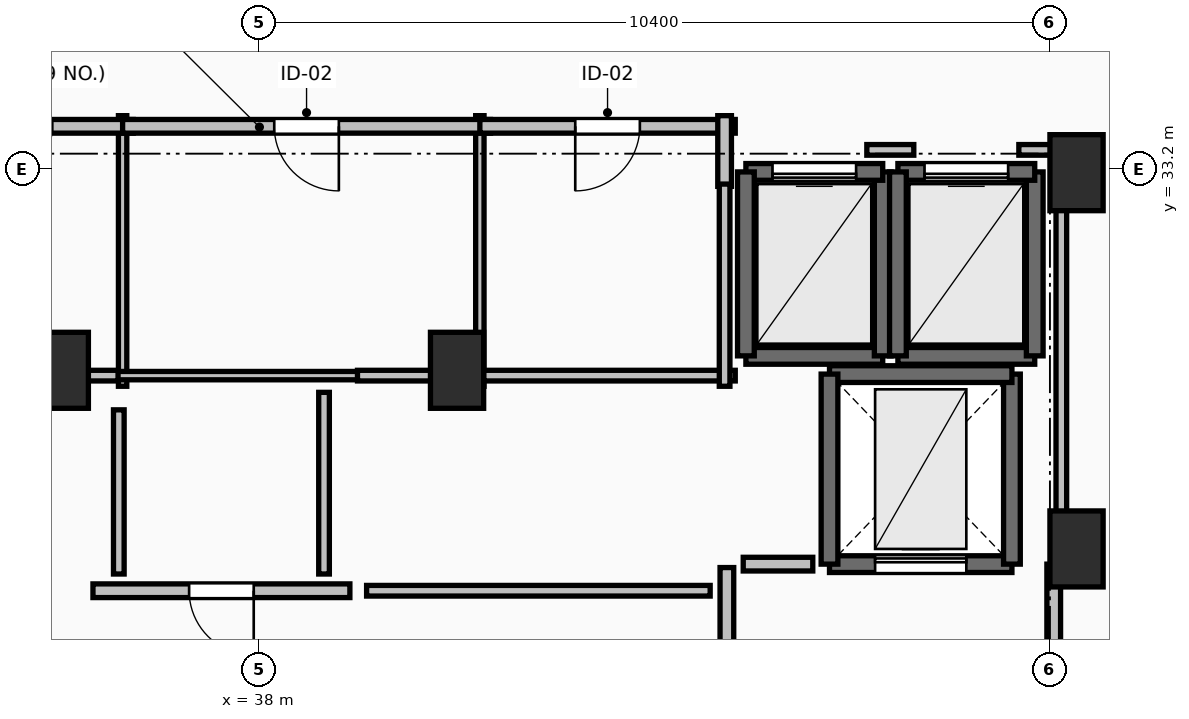
"""IFC4 building model, lengths in metres.
Left out: names, types, materials, properties, quantities, classifications, styles, units other than length and angle.
Written with IfcOpenShell. Run it as: python <this file> out.ifc"""

import sys

from ifc_helpers import new_model, si_unit, direction, frame, frame_2d, origin, origin_2d, place, context, subcontext, project, spatial, rectangle, extrude, element, fill, save


model = new_model("IFC4")
c1 = context("Model", 3, precision=1e-05, world=origin(), true_north=direction((0.0, 1.0)))
c2 = subcontext(c1, "Body", "Model", "MODEL_VIEW")
j1 = project(units=[si_unit("LENGTHUNIT", "METRE"), si_unit("PLANEANGLEUNIT", "RADIAN")], contexts=[c1])
p1 = place(None, origin())
s1 = spatial("IfcSite", under=j1, at=p1, CompositionType="ELEMENT")
p2 = place(p1, origin())
s2 = spatial("IfcBuilding", under=s1, at=p2, CompositionType="ELEMENT")
p3 = place(p2, frame((0.0, 0.0, 290.4)))
s3 = spatial("IfcBuildingStorey", under=s2, at=p3, CompositionType="ELEMENT", Elevation=290.4)
for number, where, z_axis, x_axis in (
    (1, (48.75, 33.15, 0.0), (0.0, 0.0, 1.0), (1.0, 0.0, 0.0)),
    (2, (48.75, 28.2, 0.0), (0.0, 0.0, 1.0), (1.0, 0.0, 0.0)),
    (3, (35.4, 30.55, 0.0), (0.0, 0.0, 1.0), (1.0, 0.0, 0.0)),
    (4, (40.6, 30.55, 0.0), (0.0, 0.0, 1.0), (1.0, 0.0, 0.0)),
):
    element("IfcColumn", number, at=place(p3, frame(where, z_axis=z_axis, x_axis=x_axis)), inside=s3, PredefinedType="PILASTER", context=c2, shape_type="SweptSolid", body=[
        extrude(rectangle(XDim=0.7, YDim=1.0, at=origin_2d()), origin(), (0.0, 0.0, 1.0), 5.0),
    ])
p4 = place(p3, frame((44.4, 30.74, 0.0), z_axis=(0.0, 0.0, 1.0), x_axis=(1.0, 0.0, 0.0)))
e5 = element("IfcWall", 5, at=p4, inside=s3, PredefinedType="SOLIDWALL", context=c2, shape_type="SweptSolid", body=[
    extrude(rectangle(XDim=1.8, YDim=0.22, at=frame_2d((0.9, 0.0))), origin(), (0.0, 0.0, 1.0), 4.72),
])
p5 = place(p3, frame((46.2, 30.74, 0.0), z_axis=(0.0, 0.0, 1.0), x_axis=(0.0, 1.0, 0.0)))
e6 = element("IfcWall", 6, at=p5, inside=s3, PredefinedType="SOLIDWALL", context=c2, shape_type="SweptSolid", body=[
    extrude(rectangle(XDim=2.42, YDim=0.22, at=frame_2d((1.21, 0.0))), origin(), (0.0, 0.0, 1.0), 4.72),
])
p6 = place(p3, frame((46.2, 33.16, 0.0), z_axis=(0.0, 0.0, 1.0), x_axis=(-1.0, 0.0, 0.0)))
e7 = element("IfcWall", 7, at=p6, inside=s3, PredefinedType="SOLIDWALL", context=c2, shape_type="SweptSolid", body=[
    extrude(rectangle(XDim=1.8, YDim=0.22, at=frame_2d((0.9, 0.0))), origin(), (0.0, 0.0, 1.0), 4.72),
])
p7 = place(p6, frame((0.35, 0.0, 0.0)))
e8 = element("IfcOpeningElement", 8, at=p7, cuts=e7, PredefinedType="OPENING", context=c2, shape_type="SweptSolid", body=[
    extrude(rectangle(XDim=1.1, YDim=2.2, at=frame_2d((0.55, 1.1))), frame((0.0, 0.125, 0.0), z_axis=(0.0, -1.0, 0.0), x_axis=(1.0, 0.0, 0.0)), (0.0, 0.0, 1.0), 0.25),
])
p8 = place(p3, frame((44.4, 33.16, 0.0), z_axis=(0.0, 0.0, 1.0), x_axis=(0.0, -1.0, 0.0)))
e9 = element("IfcWall", 9, at=p8, inside=s3, PredefinedType="SOLIDWALL", context=c2, shape_type="SweptSolid", body=[
    extrude(rectangle(XDim=2.42, YDim=0.22, at=frame_2d((1.21, 0.0))), origin(), (0.0, 0.0, 1.0), 4.72),
])
p9 = place(p3, frame((46.4, 30.74, 0.0), z_axis=(0.0, 0.0, 1.0), x_axis=(1.0, 0.0, 0.0)))
e10 = element("IfcWall", 10, at=p9, inside=s3, PredefinedType="SOLIDWALL", context=c2, shape_type="SweptSolid", body=[
    extrude(rectangle(XDim=1.8, YDim=0.22, at=frame_2d((0.9, 0.0))), origin(), (0.0, 0.0, 1.0), 4.72),
])
p10 = place(p3, frame((48.2, 30.74, 0.0), z_axis=(0.0, 0.0, 1.0), x_axis=(0.0, 1.0, 0.0)))
e11 = element("IfcWall", 11, at=p10, inside=s3, PredefinedType="SOLIDWALL", context=c2, shape_type="SweptSolid", body=[
    extrude(rectangle(XDim=2.42, YDim=0.22, at=frame_2d((1.21, 0.0))), origin(), (0.0, 0.0, 1.0), 4.72),
])
p11 = place(p3, frame((48.2, 33.16, 0.0), z_axis=(0.0, 0.0, 1.0), x_axis=(-1.0, 0.0, 0.0)))
e12 = element("IfcWall", 12, at=p11, inside=s3, PredefinedType="SOLIDWALL", context=c2, shape_type="SweptSolid", body=[
    extrude(rectangle(XDim=1.8, YDim=0.22, at=frame_2d((0.9, 0.0))), origin(), (0.0, 0.0, 1.0), 4.72),
])
p12 = place(p11, frame((0.35, 0.0, 0.0)))
e13 = element("IfcOpeningElement", 13, at=p12, cuts=e12, PredefinedType="OPENING", context=c2, shape_type="SweptSolid", body=[
    extrude(rectangle(XDim=1.1, YDim=2.2, at=frame_2d((0.55, 1.1))), frame((0.0, 0.125, 0.0), z_axis=(0.0, -1.0, 0.0), x_axis=(1.0, 0.0, 0.0)), (0.0, 0.0, 1.0), 0.25),
])
p13 = place(p3, frame((46.4, 33.16, 0.0), z_axis=(0.0, 0.0, 1.0), x_axis=(0.0, -1.0, 0.0)))
e14 = element("IfcWall", 14, at=p13, inside=s3, PredefinedType="SOLIDWALL", context=c2, shape_type="SweptSolid", body=[
    extrude(rectangle(XDim=2.42, YDim=0.22, at=frame_2d((1.21, 0.0))), origin(), (0.0, 0.0, 1.0), 4.72),
])
p14 = place(p3, frame((45.5, 28.0, 0.0), z_axis=(0.0, 0.0, 1.0), x_axis=(1.0, 0.0, 0.0)))
e15 = element("IfcWall", 15, at=p14, inside=s3, PredefinedType="SHEAR", context=c2, shape_type="SweptSolid", body=[
    extrude(rectangle(XDim=2.4, YDim=0.22, at=frame_2d((1.2, 0.0))), origin(), (0.0, 0.0, 1.0), 4.72),
])
p15 = place(p14, frame((0.6, 0.0, 0.0)))
e16 = element("IfcOpeningElement", 16, at=p15, cuts=e15, PredefinedType="OPENING", context=c2, shape_type="SweptSolid", body=[
    extrude(rectangle(XDim=1.2, YDim=2.2, at=frame_2d((0.6, 1.1))), frame((0.0, 0.125, 0.0), z_axis=(0.0, -1.0, 0.0), x_axis=(1.0, 0.0, 0.0)), (0.0, 0.0, 1.0), 0.25),
])
p16 = place(p3, frame((47.9, 28.0, 0.0), z_axis=(0.0, 0.0, 1.0), x_axis=(0.0, 1.0, 0.0)))
e17 = element("IfcWall", 17, at=p16, inside=s3, PredefinedType="SHEAR", context=c2, shape_type="SweptSolid", body=[
    extrude(rectangle(XDim=2.5, YDim=0.22, at=frame_2d((1.25, 0.0))), origin(), (0.0, 0.0, 1.0), 4.72),
])
p17 = place(p3, frame((47.9, 30.5, 0.0), z_axis=(0.0, 0.0, 1.0), x_axis=(-1.0, 0.0, 0.0)))
e18 = element("IfcWall", 18, at=p17, inside=s3, PredefinedType="SHEAR", context=c2, shape_type="SweptSolid", body=[
    extrude(rectangle(XDim=2.4, YDim=0.22, at=frame_2d((1.2, 0.0))), origin(), (0.0, 0.0, 1.0), 4.72),
])
p18 = place(p3, frame((45.5, 30.5, 0.0), z_axis=(0.0, 0.0, 1.0), x_axis=(0.0, -1.0, 0.0)))
e19 = element("IfcWall", 19, at=p18, inside=s3, PredefinedType="SHEAR", context=c2, shape_type="SweptSolid", body=[
    extrude(rectangle(XDim=2.5, YDim=0.22, at=frame_2d((1.25, 0.0))), origin(), (0.0, 0.0, 1.0), 4.72),
])
p19 = place(p3, frame((44.15, 27.955, 0.0), z_axis=(0.0, 0.0, 1.0), x_axis=(0.0, -1.0, 0.0)))
e20 = element("IfcWall", 20, at=p19, inside=s3, PredefinedType="PARTITIONING", context=c2, shape_type="SweptSolid", body=[
    extrude(rectangle(XDim=3.91, YDim=0.18, at=frame_2d((1.955, 0.0))), origin(), (0.0, 0.0, 1.0), 4.72),
])
p20 = place(p19, frame((1.355, 0.0, 0.0)))
e21 = element("IfcOpeningElement", 21, at=p20, cuts=e20, PredefinedType="OPENING", context=c2, shape_type="SweptSolid", body=[
    extrude(rectangle(XDim=1.2, YDim=2.15, at=frame_2d((0.6, 1.075))), frame((0.0, 0.105, 0.0), z_axis=(0.0, -1.0, 0.0), x_axis=(1.0, 0.0, 0.0)), (0.0, 0.0, 1.0), 0.21),
])
p21 = place(p3, frame((48.45, 23.95, 0.0), z_axis=(0.0, 0.0, 1.0), x_axis=(0.0, 1.0, 0.0)))
e22 = element("IfcWall", 22, at=p21, inside=s3, PredefinedType="PARTITIONING", context=c2, shape_type="SweptSolid", body=[
    extrude(rectangle(XDim=4.05, YDim=0.18, at=frame_2d((2.025, 0.0))), origin(), (0.0, 0.0, 1.0), 4.72),
])
p22 = place(p21, frame((1.425, 0.0, 0.0)))
e23 = element("IfcOpeningElement", 23, at=p22, cuts=e22, PredefinedType="OPENING", context=c2, shape_type="SweptSolid", body=[
    extrude(rectangle(XDim=1.2, YDim=2.15, at=frame_2d((0.6, 1.075))), frame((0.0, 0.105, 0.0), z_axis=(0.0, -1.0, 0.0), x_axis=(1.0, 0.0, 0.0)), (0.0, 0.0, 1.0), 0.21),
])
p23 = place(p3, frame((39.19, 27.65, 0.0), z_axis=(0.0, 0.0, 1.0), x_axis=(-1.0, 0.0, 0.0)))
e24 = element("IfcWall", 24, at=p23, inside=s3, PredefinedType="PARTITIONING", context=c2, shape_type="SweptSolid", body=[
    extrude(rectangle(XDim=3.38, YDim=0.18, at=frame_2d((1.69, 0.0))), origin(), (0.0, 0.0, 1.0), 4.72),
])
p24 = place(p23, frame((1.265, 0.0, 0.0)))
e25 = element("IfcOpeningElement", 25, at=p24, cuts=e24, PredefinedType="OPENING", context=c2, shape_type="SweptSolid", body=[
    extrude(rectangle(XDim=0.85, YDim=2.1, at=frame_2d((0.425, 1.05))), frame((0.0, 0.105, 0.0), z_axis=(0.0, -1.0, 0.0), x_axis=(1.0, 0.0, 0.0)), (0.0, 0.0, 1.0), 0.21),
])
p25 = place(p3, frame((36.2, 30.34, 0.0), z_axis=(0.0, 0.0, 1.0), x_axis=(0.0, 1.0, 0.0)))
e26 = element("IfcWall", 26, at=p25, inside=s3, PredefinedType="PARTITIONING", context=c2, shape_type="SweptSolid", body=[
    extrude(rectangle(XDim=3.56, YDim=0.11, at=frame_2d((1.78, 0.0))), origin(), (0.0, 0.0, 1.0), 3.912),
])
p26 = place(p3, frame((36.34, 33.76, 0.0), z_axis=(0.0, 0.0, 1.0), x_axis=(-1.0, 0.0, 0.0)))
e27 = element("IfcWall", 27, at=p26, inside=s3, PredefinedType="PARTITIONING", context=c2, shape_type="SweptSolid", body=[
    extrude(rectangle(XDim=2.98, YDim=0.18, at=frame_2d((1.49, 0.0))), origin(), (0.0, 0.0, 1.0), 4.72),
])
p27 = place(p26, frame((1.065, 0.0, 0.0)))
e28 = element("IfcOpeningElement", 28, at=p27, cuts=e27, PredefinedType="OPENING", context=c2, shape_type="SweptSolid", body=[
    extrude(rectangle(XDim=0.85, YDim=2.1, at=frame_2d((0.425, 1.05))), frame((0.0, 0.105, 0.0), z_axis=(0.0, -1.0, 0.0), x_axis=(1.0, 0.0, 0.0)), (0.0, 0.0, 1.0), 0.21),
])
p28 = place(p3, frame((40.9, 30.34, 0.0), z_axis=(0.0, 0.0, 1.0), x_axis=(0.0, 1.0, 0.0)))
e29 = element("IfcWall", 29, at=p28, inside=s3, PredefinedType="PARTITIONING", context=c2, shape_type="SweptSolid", body=[
    extrude(rectangle(XDim=3.56, YDim=0.11, at=frame_2d((1.78, 0.0))), origin(), (0.0, 0.0, 1.0), 4.72),
])
p29 = place(p3, frame((36.11, 30.48, 0.0), z_axis=(0.0, 0.0, 1.0), x_axis=(1.0, 0.0, 0.0)))
e30 = element("IfcWall", 30, at=p29, inside=s3, PredefinedType="PARTITIONING", context=c2, shape_type="SweptSolid", body=[
    extrude(rectangle(XDim=3.21, YDim=0.11, at=frame_2d((1.605, 0.0))), origin(), (0.0, 0.0, 1.0), 3.912),
])
p30 = place(p3, frame((41.04, 33.76, 0.0), z_axis=(0.0, 0.0, 1.0), x_axis=(-1.0, 0.0, 0.0)))
e31 = element("IfcWall", 31, at=p30, inside=s3, PredefinedType="PARTITIONING", context=c2, shape_type="SweptSolid", body=[
    extrude(rectangle(XDim=4.84, YDim=0.18, at=frame_2d((2.42, 0.0))), origin(), (0.0, 0.0, 1.0), 4.72),
])
p31 = place(p30, frame((1.995, 0.0, 0.0)))
e32 = element("IfcOpeningElement", 32, at=p31, cuts=e31, PredefinedType="OPENING", context=c2, shape_type="SweptSolid", body=[
    extrude(rectangle(XDim=0.85, YDim=2.1, at=frame_2d((0.425, 1.05))), frame((0.0, 0.105, 0.0), z_axis=(0.0, -1.0, 0.0), x_axis=(1.0, 0.0, 0.0)), (0.0, 0.0, 1.0), 0.21),
])
p32 = place(p3, frame((44.26, 33.76, 0.0), z_axis=(0.0, 0.0, 1.0), x_axis=(-1.0, 0.0, 0.0)))
e33 = element("IfcWall", 33, at=p32, inside=s3, PredefinedType="PARTITIONING", context=c2, shape_type="SweptSolid", body=[
    extrude(rectangle(XDim=3.36, YDim=0.18, at=frame_2d((1.68, 0.0))), origin(), (0.0, 0.0, 1.0), 4.72),
])
p33 = place(p32, frame((1.255, 0.0, 0.0)))
e34 = element("IfcOpeningElement", 34, at=p33, cuts=e33, PredefinedType="OPENING", context=c2, shape_type="SweptSolid", body=[
    extrude(rectangle(XDim=0.85, YDim=2.1, at=frame_2d((0.425, 1.05))), frame((0.0, 0.105, 0.0), z_axis=(0.0, -1.0, 0.0), x_axis=(1.0, 0.0, 0.0)), (0.0, 0.0, 1.0), 0.21),
])
p34 = place(p3, frame((44.12, 32.97, 0.0), z_axis=(0.0, 0.0, 1.0), x_axis=(0.0, 1.0, 0.0)))
e35 = element("IfcWall", 35, at=p34, inside=s3, PredefinedType="PARTITIONING", context=c2, shape_type="SweptSolid", body=[
    extrude(rectangle(XDim=0.93, YDim=0.18, at=frame_2d((0.465, 0.0))), origin(), (0.0, 0.0, 1.0), 4.72),
])
p35 = place(p3, frame((45.28, 28.0, 0.0), z_axis=(0.0, 0.0, 1.0), x_axis=(-1.0, 0.0, 0.0)))
e36 = element("IfcWall", 36, at=p35, inside=s3, PredefinedType="PARTITIONING", context=c2, shape_type="SweptSolid", body=[
    extrude(rectangle(XDim=0.915, YDim=0.18, at=frame_2d((0.458, 0.0))), origin(), (0.0, 0.0, 1.0), 4.72),
])
p36 = place(p3, frame((43.93, 27.65, 0.0), z_axis=(0.0, 0.0, 1.0), x_axis=(-1.0, 0.0, 0.0)))
e37 = element("IfcWall", 37, at=p36, inside=s3, PredefinedType="PARTITIONING", context=c2, shape_type="SweptSolid", body=[
    extrude(rectangle(XDim=4.52, YDim=0.14, at=frame_2d((2.26, 0.0))), origin(), (0.0, 0.0, 1.0), 4.72),
])
p37 = place(p3, frame((35.14, 30.48, 0.0), z_axis=(0.0, 0.0, 1.0), x_axis=(1.0, 0.0, 0.0)))
e38 = element("IfcWall", 38, at=p37, inside=s3, PredefinedType="PARTITIONING", context=c2, shape_type="SweptSolid", body=[
    extrude(rectangle(XDim=1.0, YDim=0.14, at=frame_2d((0.5, 0.0))), origin(), (0.0, 0.0, 1.0), 3.912),
])
p38 = place(p3, frame((39.29, 30.48, 0.0), z_axis=(0.0, 0.0, 1.0), x_axis=(1.0, 0.0, 0.0)))
e39 = element("IfcWall", 39, at=p38, inside=s3, PredefinedType="PARTITIONING", context=c2, shape_type="SweptSolid", body=[
    extrude(rectangle(XDim=1.64, YDim=0.14, at=frame_2d((0.82, 0.0))), origin(), (0.0, 0.0, 1.0), 3.912),
])
p39 = place(p3, frame((40.95, 30.48, 0.0), z_axis=(0.0, 0.0, 1.0), x_axis=(1.0, 0.0, 0.0)))
e40 = element("IfcWall", 40, at=p39, inside=s3, PredefinedType="PARTITIONING", context=c2, shape_type="SweptSolid", body=[
    extrude(rectangle(XDim=3.31, YDim=0.14, at=frame_2d((1.655, 0.0))), origin(), (0.0, 0.0, 1.0), 4.72),
])
p40 = place(p3, frame((44.12, 30.34, 0.0), z_axis=(0.0, 0.0, 1.0), x_axis=(0.0, 1.0, 0.0)))
e41 = element("IfcWall", 41, at=p40, inside=s3, PredefinedType="PARTITIONING", context=c2, shape_type="SweptSolid", body=[
    extrude(rectangle(XDim=2.66, YDim=0.14, at=frame_2d((1.33, 0.0))), origin(), (0.0, 0.0, 1.0), 4.72),
])
p41 = place(p3, frame((36.15, 30.03, 0.0), z_axis=(0.0, 0.0, 1.0), x_axis=(0.0, -1.0, 0.0)))
e42 = element("IfcWall", 42, at=p41, inside=s3, PredefinedType="PARTITIONING", context=c2, shape_type="SweptSolid", body=[
    extrude(rectangle(XDim=2.16, YDim=0.14, at=frame_2d((1.08, 0.0))), origin(), (0.0, 0.0, 1.0), 4.72),
])
p42 = place(p3, frame((38.85, 27.87, 0.0), z_axis=(0.0, 0.0, 1.0), x_axis=(0.0, 1.0, 0.0)))
e43 = element("IfcWall", 43, at=p42, inside=s3, PredefinedType="PARTITIONING", context=c2, shape_type="SweptSolid", body=[
    extrude(rectangle(XDim=2.39, YDim=0.14, at=frame_2d((1.195, 0.0))), origin(), (0.0, 0.0, 1.0), 4.72),
])
p43 = place(p3, frame((48.55, 28.196, 0.0), z_axis=(0.0, 0.0, 1.0), x_axis=(0.0, 1.0, 0.0)))
e44 = element("IfcWall", 44, at=p43, inside=s3, PredefinedType="PARTITIONING", context=c2, shape_type="SweptSolid", body=[
    extrude(rectangle(XDim=5.254, YDim=0.14, at=frame_2d((2.627, 0.0))), origin(), (0.0, 0.0, 1.0), 3.912),
])
p44 = place(p3, frame((48.55, 33.45, 0.0), z_axis=(0.0, 0.0, 1.0), x_axis=(-1.0, 0.0, 0.0)))
e45 = element("IfcWall", 45, at=p44, inside=s3, PredefinedType="PARTITIONING", context=c2, shape_type="SweptSolid", body=[
    extrude(rectangle(XDim=0.559, YDim=0.14, at=frame_2d((0.28, 0.0))), origin(), (0.0, 0.0, 1.0), 3.912),
])
p45 = place(p3, frame((46.609, 33.45, 0.0), z_axis=(0.0, 0.0, 1.0), x_axis=(-1.0, 0.0, 0.0)))
e46 = element("IfcWall", 46, at=p45, inside=s3, PredefinedType="PARTITIONING", context=c2, shape_type="SweptSolid", body=[
    extrude(rectangle(XDim=0.618, YDim=0.14, at=frame_2d((0.309, 0.0))), origin(), (0.0, 0.0, 1.0), 4.72),
])
p46 = place(p7, origin())
e47 = element("IfcDoor", 47, at=p46, inside=s3, OperationType="SLIDING_TO_LEFT", PredefinedType="DOOR", context=c2, shape_type="SweptSolid", body=[
    extrude(rectangle(XDim=1.1, YDim=2.2, at=frame_2d((0.55, 1.1))), frame((0.0, 0.025, 0.0), z_axis=(0.0, -1.0, 0.0), x_axis=(1.0, 0.0, 0.0)), (0.0, 0.0, 1.0), 0.05),
])
fill(e8, e47)
p47 = place(p12, origin())
e48 = element("IfcDoor", 48, at=p47, inside=s3, OperationType="SLIDING_TO_LEFT", PredefinedType="DOOR", context=c2, shape_type="SweptSolid", body=[
    extrude(rectangle(XDim=1.1, YDim=2.2, at=frame_2d((0.55, 1.1))), frame((0.0, 0.025, 0.0), z_axis=(0.0, -1.0, 0.0), x_axis=(1.0, 0.0, 0.0)), (0.0, 0.0, 1.0), 0.05),
])
fill(e13, e48)
p48 = place(p15, origin())
e49 = element("IfcDoor", 49, at=p48, inside=s3, OperationType="SLIDING_TO_LEFT", PredefinedType="DOOR", context=c2, shape_type="SweptSolid", body=[
    extrude(rectangle(XDim=1.2, YDim=2.2, at=frame_2d((0.6, 1.1))), frame((0.0, 0.025, 0.0), z_axis=(0.0, -1.0, 0.0), x_axis=(1.0, 0.0, 0.0)), (0.0, 0.0, 1.0), 0.05),
])
fill(e16, e49)
p49 = place(p24, origin())
e50 = element("IfcDoor", 50, at=p49, inside=s3, OperationType="SINGLE_SWING_LEFT", PredefinedType="DOOR", context=c2, shape_type="SweptSolid", body=[
    extrude(rectangle(XDim=0.85, YDim=2.1, at=frame_2d((0.425, 1.05))), frame((0.0, 0.025, 0.0), z_axis=(0.0, -1.0, 0.0), x_axis=(1.0, 0.0, 0.0)), (0.0, 0.0, 1.0), 0.05),
])
fill(e25, e50)
p50 = place(p27, origin())
e51 = element("IfcDoor", 51, at=p50, inside=s3, OperationType="SINGLE_SWING_RIGHT", PredefinedType="DOOR", context=c2, shape_type="SweptSolid", body=[
    extrude(rectangle(XDim=0.85, YDim=2.1, at=frame_2d((0.425, 1.05))), frame((0.0, 0.025, 0.0), z_axis=(0.0, -1.0, 0.0), x_axis=(1.0, 0.0, 0.0)), (0.0, 0.0, 1.0), 0.05),
])
fill(e28, e51)
p51 = place(p31, origin())
e52 = element("IfcDoor", 52, at=p51, inside=s3, OperationType="SINGLE_SWING_LEFT", PredefinedType="DOOR", context=c2, shape_type="SweptSolid", body=[
    extrude(rectangle(XDim=0.85, YDim=2.1, at=frame_2d((0.425, 1.05))), frame((0.0, 0.025, 0.0), z_axis=(0.0, -1.0, 0.0), x_axis=(1.0, 0.0, 0.0)), (0.0, 0.0, 1.0), 0.05),
])
fill(e32, e52)
p52 = place(p33, origin())
e53 = element("IfcDoor", 53, at=p52, inside=s3, OperationType="SINGLE_SWING_RIGHT", PredefinedType="DOOR", context=c2, shape_type="SweptSolid", body=[
    extrude(rectangle(XDim=0.85, YDim=2.1, at=frame_2d((0.425, 1.05))), frame((0.0, 0.025, 0.0), z_axis=(0.0, -1.0, 0.0), x_axis=(1.0, 0.0, 0.0)), (0.0, 0.0, 1.0), 0.05),
])
fill(e34, e53)
save(model, sys.argv[1])
